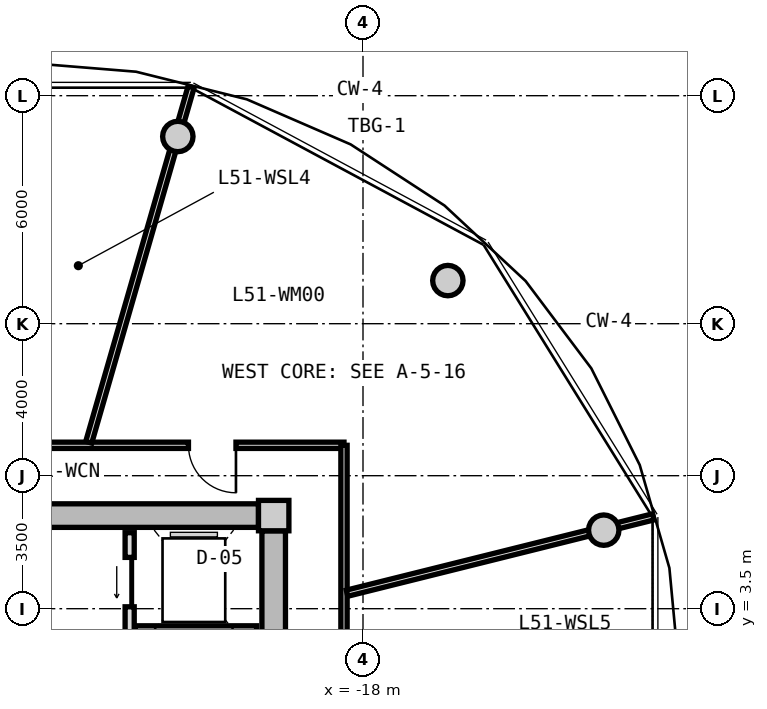
"""IFC4 building model, lengths in metres.
Left out: names, types, materials, properties, quantities, classifications, styles, units other than length and angle.
Written with IfcOpenShell. Run it as: python <this file> out.ifc"""

import sys

from ifc_helpers import new_model, si_unit, direction, frame, frame_2d, origin, origin_2d, place, context, subcontext, project, spatial, rectangle, circle, extrude, source, transform, mapped, element, fill, save


model = new_model("IFC4")
c1 = context("Model", 3, precision=1e-05, world=origin(), true_north=direction((0.0, 1.0)))
c2 = subcontext(c1, "Body", "Model", "MODEL_VIEW")
j1 = project(units=[si_unit("LENGTHUNIT", "METRE"), si_unit("PLANEANGLEUNIT", "RADIAN")], contexts=[c1])
p1 = place(None, origin())
s1 = spatial("IfcSite", under=j1, at=p1, CompositionType="ELEMENT")
p2 = place(p1, origin())
s2 = spatial("IfcBuilding", under=s1, at=p2, CompositionType="ELEMENT")
p3 = place(p2, frame((0.0, 0.0, 164.8)))
s3 = spatial("IfcBuildingStorey", under=s2, at=p3, CompositionType="ELEMENT", Elevation=164.8)
m1 = source(origin(), c2, "Body", "SweptSolid", [
    extrude(rectangle(XDim=0.8, YDim=0.8, at=origin_2d()), origin(), (0.0, 0.0, 1.0), 3.05),
])
p4 = place(p3, frame((-20.35, 5.95, 0.0), z_axis=(0.0, 0.0, 1.0), x_axis=(1.0, 0.0, 0.0)))
e1 = element("IfcColumn", 1, at=p4, inside=s3, PredefinedType="COLUMN", context=c2, shape_type="MappedRepresentation", body=[
    mapped(m1, transform((0.0, 0.0, 0.0), x_axis=(1.0, 0.0, 0.0), y_axis=(0.0, 1.0, 0.0), z_axis=(0.0, 0.0, 1.0), scale=1.0)),
])
m2 = source(origin(), c2, "Body", "SweptSolid", [
    extrude(rectangle(XDim=14.5, YDim=0.62, at=frame_2d((7.25, 0.0))), origin(), (0.0, 0.0, 1.0), 2.81),
])
p5 = place(p3, frame((-35.25, 5.95, 0.0), z_axis=(0.0, 0.0, 1.0), x_axis=(1.0, 0.0, 0.0)))
e2 = element("IfcWall", 2, at=p5, inside=s3, PredefinedType="SHEAR", context=c2, shape_type="MappedRepresentation", body=[
    mapped(m2, transform((0.0, 0.0, 0.0), x_axis=(1.0, 0.0, 0.0), y_axis=(0.0, 1.0, 0.0), z_axis=(0.0, 0.0, 1.0), scale=1.0)),
])
m3 = source(origin(), c2, "Body", "SweptSolid", [
    extrude(rectangle(XDim=11.1, YDim=0.62, at=frame_2d((5.55, 0.0))), origin(), (0.0, 0.0, 1.0), 2.81),
])
p6 = place(p3, frame((-20.35, 5.55, 0.0), z_axis=(0.0, 0.0, 1.0), x_axis=(0.0, -1.0, 0.0)))
e3 = element("IfcWall", 3, at=p6, inside=s3, PredefinedType="SHEAR", context=c2, shape_type="MappedRepresentation", body=[
    mapped(m3, transform((0.0, 0.0, 0.0), x_axis=(1.0, 0.0, 0.0), y_axis=(0.0, 1.0, 0.0), z_axis=(0.0, 0.0, 1.0), scale=1.0)),
])
p7 = place(p6, frame((5.65, 0.0, 0.0)))
e4 = element("IfcOpeningElement", 4, at=p7, cuts=e3, PredefinedType="OPENING", context=c2, shape_type="SweptSolid", body=[
    extrude(rectangle(XDim=1.2, YDim=2.15, at=frame_2d((0.6, 1.075))), frame((0.0, 0.32, 0.0), z_axis=(0.0, -1.0, 0.0), x_axis=(1.0, 0.0, 0.0)), (0.0, 0.0, 1.0), 0.64),
])
m4 = source(origin(), c2, "Body", "SweptSolid", [
    extrude(circle(Radius=0.4, at=origin_2d()), origin(), (0.0, 0.0, 1.0), 3.05),
])
for number, where, z_axis, x_axis in (
    (5, (-11.665, 5.567, 0.0), (0.0, 0.0, 1.0), (1.0, 0.0, 0.0)),
    (6, (-15.767, 12.135, 0.0), (0.0, 0.0, 1.0), (1.0, 0.0, 0.0)),
    (7, (-22.873, 15.926, 0.0), (0.0, 0.0, 1.0), (1.0, 0.0, 0.0)),
):
    element("IfcColumn", number, at=place(p3, frame(where, z_axis=z_axis, x_axis=x_axis)), inside=s3, PredefinedType="COLUMN", context=c2, shape_type="MappedRepresentation", body=[
        mapped(m4, transform((0.0, 0.0, 0.0), x_axis=(1.0, 0.0, 0.0), y_axis=(0.0, 1.0, 0.0), z_axis=(0.0, 0.0, 1.0), scale=1.0)),
    ])
m5 = source(origin(), c2, "Body", "SweptSolid", [
    extrude(rectangle(XDim=5.0, YDim=0.24, at=frame_2d((2.5, 0.0))), origin(), (0.0, 0.0, 1.0), 2.795),
])
p8 = place(p3, frame((-24.14, 0.5, 0.0), z_axis=(0.0, 0.0, 1.0), x_axis=(0.0, 1.0, 0.0)))
e8 = element("IfcWall", 8, at=p8, inside=s3, PredefinedType="PARTITIONING", context=c2, shape_type="MappedRepresentation", body=[
    mapped(m5, transform((0.0, 0.0, 0.0), x_axis=(1.0, 0.0, 0.0), y_axis=(0.0, 1.0, 0.0), z_axis=(0.0, 0.0, 1.0), scale=1.0)),
])
p9 = place(p8, frame((3.05, 0.0, 0.0)))
e9 = element("IfcOpeningElement", 9, at=p9, cuts=e8, PredefinedType="OPENING", context=c2, shape_type="SweptSolid", body=[
    extrude(rectangle(XDim=1.3, YDim=2.2, at=frame_2d((0.65, 1.1))), frame((0.0, 0.13, 0.0), z_axis=(0.0, -1.0, 0.0), x_axis=(1.0, 0.0, 0.0)), (0.0, 0.0, 1.0), 0.26),
])
p10 = place(p8, frame((0.55, 0.0, 0.0)))
e10 = element("IfcOpeningElement", 10, at=p10, cuts=e8, PredefinedType="OPENING", context=c2, shape_type="SweptSolid", body=[
    extrude(rectangle(XDim=1.3, YDim=2.2, at=frame_2d((0.65, 1.1))), frame((0.0, 0.13, 0.0), z_axis=(0.0, -1.0, 0.0), x_axis=(1.0, 0.0, 0.0)), (0.0, 0.0, 1.0), 0.26),
])
m6 = source(origin(), c2, "Body", "SweptSolid", [
    extrude(rectangle(XDim=3.2, YDim=0.2, at=frame_2d((1.6, 0.0))), origin(), (0.0, 0.0, 1.0), 2.795),
])
p11 = place(p3, frame((-24.0, 2.95, 0.0), z_axis=(0.0, 0.0, 1.0), x_axis=(1.0, 0.0, 0.0)))
e11 = element("IfcWall", 11, at=p11, inside=s3, PredefinedType="PARTITIONING", context=c2, shape_type="MappedRepresentation", body=[
    mapped(m6, transform((0.0, 0.0, 0.0), x_axis=(1.0, 0.0, 0.0), y_axis=(0.0, 1.0, 0.0), z_axis=(0.0, 0.0, 1.0), scale=1.0)),
])
m7 = source(origin(), c2, "Body", "SweptSolid", [
    extrude(rectangle(XDim=8.58, YDim=0.165, at=frame_2d((4.29, 0.0))), origin(), (0.0, 0.0, 1.0), 2.795),
])
p12 = place(p3, frame((-27.08, 7.8, 0.0), z_axis=(0.0, 0.0, 1.0), x_axis=(1.0, 0.0, 0.0)))
e12 = element("IfcWall", 12, at=p12, inside=s3, PredefinedType="PARTITIONING", context=c2, shape_type="MappedRepresentation", body=[
    mapped(m7, transform((0.0, 0.0, 0.0), x_axis=(1.0, 0.0, 0.0), y_axis=(0.0, 1.0, 0.0), z_axis=(0.0, 0.0, 1.0), scale=1.0)),
])
p13 = place(p12, frame((4.487, 0.0, 0.0)))
e13 = element("IfcOpeningElement", 13, at=p13, cuts=e12, PredefinedType="OPENING", context=c2, shape_type="SweptSolid", body=[
    extrude(rectangle(XDim=1.25, YDim=2.2, at=frame_2d((0.625, 1.1))), frame((0.0, 0.093, 0.0), z_axis=(0.0, -1.0, 0.0), x_axis=(1.0, 0.0, 0.0)), (0.0, 0.0, 1.0), 0.185),
])
m8 = source(origin(), c2, "Body", "SweptSolid", [
    extrude(rectangle(XDim=6.88, YDim=0.165, at=frame_2d((3.44, 0.0))), origin(), (0.0, 0.0, 1.0), 2.795),
])
p14 = place(p3, frame((-18.5, 7.8, 0.0), z_axis=(0.0, 0.0, 1.0), x_axis=(0.0, -1.0, 0.0)))
e14 = element("IfcWall", 14, at=p14, inside=s3, PredefinedType="PARTITIONING", context=c2, shape_type="MappedRepresentation", body=[
    mapped(m8, transform((0.0, 0.0, 0.0), x_axis=(1.0, 0.0, 0.0), y_axis=(0.0, 1.0, 0.0), z_axis=(0.0, 0.0, 1.0), scale=1.0)),
])
m9 = source(origin(), c2, "Body", "SweptSolid", [
    extrude(rectangle(XDim=9.73, YDim=0.165, at=frame_2d((4.865, 0.0))), origin(), (0.0, 0.0, 1.0), 2.345),
])
p15 = place(p3, frame((-25.217, 7.88, 0.0), z_axis=(0.0, 0.0, 1.0), x_axis=(0.27679492614, 0.960929013436, 0.0)))
e15 = element("IfcWall", 15, at=p15, inside=s3, PredefinedType="PARTITIONING", context=c2, shape_type="MappedRepresentation", body=[
    mapped(m9, transform((0.0, 0.0, 0.0), x_axis=(1.0, 0.0, 0.0), y_axis=(0.0, 1.0, 0.0), z_axis=(0.0, 0.0, 1.0), scale=1.0)),
])
m10 = source(origin(), c2, "Body", "SweptSolid", [
    extrude(rectangle(XDim=8.305, YDim=0.165, at=frame_2d((4.153, 0.0))), origin(), (0.0, 0.0, 1.0), 2.345),
])
p16 = place(p3, frame((-18.42, 3.908, 0.0), z_axis=(0.0, 0.0, 1.0), x_axis=(0.970309994378, 0.241864662175, 0.0)))
e16 = element("IfcWall", 16, at=p16, inside=s3, PredefinedType="PARTITIONING", context=c2, shape_type="MappedRepresentation", body=[
    mapped(m10, transform((0.0, 0.0, 0.0), x_axis=(1.0, 0.0, 0.0), y_axis=(0.0, 1.0, 0.0), z_axis=(0.0, 0.0, 1.0), scale=1.0)),
])
m11 = source(origin(), c2, "Body", "SweptSolid", [
    extrude(rectangle(XDim=1.3, YDim=2.2, at=frame_2d((0.65, 1.1))), frame((0.0, 0.025, 0.0), z_axis=(0.0, -1.0, 0.0), x_axis=(1.0, 0.0, 0.0)), (0.0, 0.0, 1.0), 0.05),
])
p17 = place(p9, origin())
e17 = element("IfcDoor", 17, at=p17, inside=s3, OperationType="SLIDING_TO_LEFT", PredefinedType="DOOR", context=c2, shape_type="MappedRepresentation", body=[
    mapped(m11, transform((0.0, 0.0, 0.0), x_axis=(1.0, 0.0, 0.0), y_axis=(0.0, 1.0, 0.0), z_axis=(0.0, 0.0, 1.0), scale=1.0)),
])
fill(e9, e17)
m12 = source(origin(), c2, "Body", "SweptSolid", [
    extrude(rectangle(XDim=1.25, YDim=2.2, at=frame_2d((0.625, 1.1))), frame((0.0, 0.025, 0.0), z_axis=(0.0, -1.0, 0.0), x_axis=(1.0, 0.0, 0.0)), (0.0, 0.0, 1.0), 0.05),
])
p18 = place(p13, frame((1.25, 0.0, 0.0), z_axis=(0.0, 0.0, 1.0), x_axis=(-1.0, 0.0, 0.0)))
e18 = element("IfcDoor", 18, at=p18, inside=s3, OperationType="SINGLE_SWING_LEFT", PredefinedType="DOOR", context=c2, shape_type="MappedRepresentation", body=[
    mapped(m12, transform((0.0, 0.0, 0.0), x_axis=(1.0, 0.0, 0.0), y_axis=(0.0, 1.0, 0.0), z_axis=(0.0, 0.0, 1.0), scale=1.0)),
])
fill(e13, e18)
save(model, sys.argv[1])
